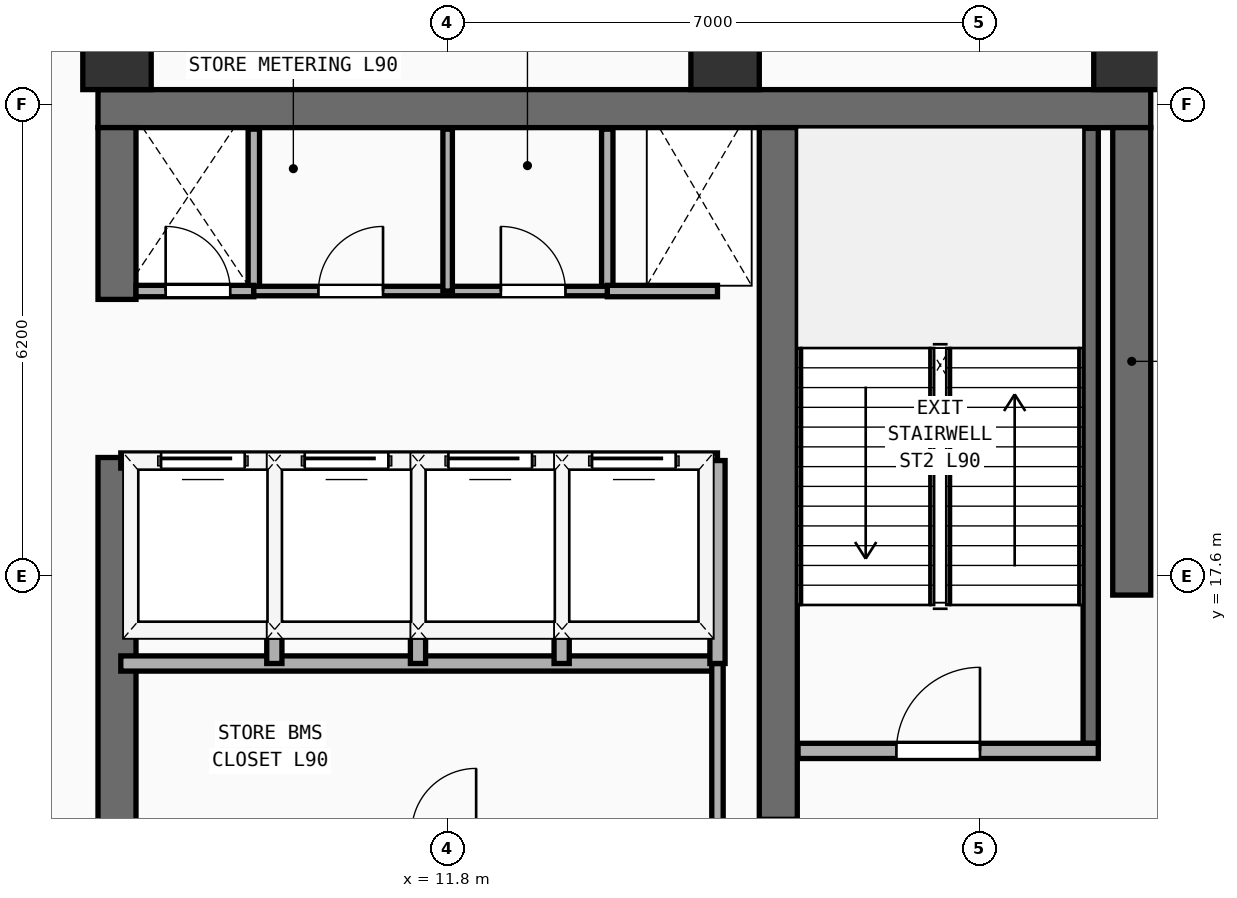
"""IFC4 building model, lengths in metres.
Left out: names, types, materials, properties, quantities, classifications, styles, units other than length and angle.
Written with IfcOpenShell. Run it as: python <this file> out.ifc"""

import sys

from ifc_helpers import new_model, si_unit, direction, frame, frame_2d, origin, origin_2d, place, context, subcontext, project, spatial, rectangle, extrude, element, fill, save


model = new_model("IFC4")
c1 = context("Model", 3, precision=1e-05, world=origin(), true_north=direction((0.0, 1.0)))
c2 = subcontext(c1, "Body", "Model", "MODEL_VIEW")
j1 = project(units=[si_unit("LENGTHUNIT", "METRE"), si_unit("PLANEANGLEUNIT", "RADIAN")], contexts=[c1])
p1 = place(None, origin())
s1 = spatial("IfcSite", under=j1, at=p1, CompositionType="ELEMENT")
p2 = place(p1, origin())
s2 = spatial("IfcBuilding", under=s1, at=p2, CompositionType="ELEMENT")
p3 = place(p2, frame((0.0, 0.0, 352.0)))
s3 = spatial("IfcBuildingStorey", under=s2, at=p3, CompositionType="ELEMENT", Elevation=352.0)
p4 = place(p3, frame((7.2, 23.75, 0.0), z_axis=(0.0, 0.0, 1.0), x_axis=(1.0, 0.0, 0.0)))
e1 = element("IfcWall", 1, at=p4, inside=s3, PredefinedType="SHEAR", context=c2, shape_type="SweptSolid", body=[
    extrude(rectangle(XDim=13.85, YDim=0.5, at=frame_2d((6.925, 0.0))), origin(), (0.0, 0.0, 1.0), 3.82),
])
p5 = place(p3, frame((7.45, 14.35, 0.0), z_axis=(0.0, 0.0, 1.0), x_axis=(0.0, 1.0, 0.0)))
e2 = element("IfcWall", 2, at=p5, inside=s3, PredefinedType="SHEAR", context=c2, shape_type="SweptSolid", body=[
    extrude(rectangle(XDim=4.81, YDim=0.5, at=frame_2d((2.405, 0.0))), origin(), (0.0, 0.0, 1.0), 3.82),
])
p6 = place(p3, frame((7.45, 21.24, 0.0), z_axis=(0.0, 0.0, 1.0), x_axis=(0.0, 1.0, 0.0)))
e3 = element("IfcWall", 3, at=p6, inside=s3, PredefinedType="SHEAR", context=c2, shape_type="SweptSolid", body=[
    extrude(rectangle(XDim=2.26, YDim=0.5, at=frame_2d((1.13, 0.0))), origin(), (0.0, 0.0, 1.0), 3.82),
])
p7 = place(p3, frame((20.8, 17.35, 0.0), z_axis=(0.0, 0.0, 1.0), x_axis=(0.0, 1.0, 0.0)))
e4 = element("IfcWall", 4, at=p7, inside=s3, PredefinedType="SHEAR", context=c2, shape_type="SweptSolid", body=[
    extrude(rectangle(XDim=6.15, YDim=0.5, at=frame_2d((3.075, 0.0))), origin(), (0.0, 0.0, 1.0), 3.82),
])
p8 = place(p3, frame((16.15, 14.4, 0.0), z_axis=(0.0, 0.0, 1.0), x_axis=(0.0, 1.0, 0.0)))
e5 = element("IfcWall", 5, at=p8, inside=s3, PredefinedType="SHEAR", context=c2, shape_type="SweptSolid", body=[
    extrude(rectangle(XDim=9.1, YDim=0.5, at=frame_2d((4.55, 0.0))), origin(), (0.0, 0.0, 1.0), 3.82),
])
for number, where, z_axis, x_axis in (
    (6, (7.45, 24.45, 0.0), (0.0, 0.0, 1.0), (1.0, 0.0, 0.0)),
    (7, (15.45, 24.45, 0.0), (0.0, 0.0, 1.0), (1.0, 0.0, 0.0)),
    (8, (20.75, 24.45, 0.0), (0.0, 0.0, 1.0), (1.0, 0.0, 0.0)),
):
    element("IfcColumn", number, at=place(p3, frame(where, z_axis=z_axis, x_axis=x_axis)), inside=s3, PredefinedType="COLUMN", context=c2, shape_type="SweptSolid", body=[
        extrude(rectangle(XDim=0.9, YDim=0.9, at=origin_2d()), origin(), (0.0, 0.0, 1.0), 3.82),
    ])
p9 = place(p3, frame((27.685, 19.175, 0.0), z_axis=(0.0, 0.0, 1.0), x_axis=(-0.707106781187, 0.707106781187, 0.0)))
e9 = element("IfcWall", 9, at=p9, inside=s3, PredefinedType="SOLIDWALL", context=c2, shape_type="SweptSolid", body=[
    extrude(rectangle(XDim=9.207, YDim=0.28, at=frame_2d((4.603, 0.0))), origin(), (0.0, 0.0, 1.0), 3.82),
])
p10 = place(p3, frame((20.26, 15.4, 0.0), z_axis=(0.0, 0.0, 1.0), x_axis=(0.0, 1.0, 0.0)))
e10 = element("IfcWall", 10, at=p10, inside=s3, PredefinedType="SHEAR", context=c2, shape_type="SweptSolid", body=[
    extrude(rectangle(XDim=8.09, YDim=0.2, at=frame_2d((4.045, 0.0))), origin(), (0.0, 0.0, 1.0), 3.82),
])
p11 = place(p3, frame((16.41, 15.3, 0.0), z_axis=(0.0, 0.0, 1.0), x_axis=(1.0, 0.0, 0.0)))
e11 = element("IfcWall", 11, at=p11, inside=s3, PredefinedType="PARTITIONING", context=c2, shape_type="SweptSolid", body=[
    extrude(rectangle(XDim=3.95, YDim=0.2, at=frame_2d((1.975, 0.0))), origin(), (0.0, 0.0, 1.0), 3.82),
])
p12 = place(p11, frame((1.294, 0.0, 0.0)))
e12 = element("IfcOpeningElement", 12, at=p12, cuts=e11, PredefinedType="OPENING", context=c2, shape_type="SweptSolid", body=[
    extrude(rectangle(XDim=1.1, YDim=2.2, at=frame_2d((0.55, 1.1))), frame((0.0, 0.11, 0.0), z_axis=(0.0, -1.0, 0.0), x_axis=(1.0, 0.0, 0.0)), (0.0, 0.0, 1.0), 0.22),
])
p13 = place(p3, frame((7.5, 16.45, 0.0), z_axis=(0.0, 0.0, 1.0), x_axis=(1.0, 0.0, 0.0)))
e13 = element("IfcWall", 13, at=p13, inside=s3, PredefinedType="PARTITIONING", context=c2, shape_type="SweptSolid", body=[
    extrude(rectangle(XDim=7.85, YDim=0.2, at=frame_2d((3.925, 0.0))), origin(), (0.0, 0.0, 1.0), 3.82),
])
p14 = place(p3, frame((15.35, 14.22, 0.0), z_axis=(0.0, 0.0, 1.0), x_axis=(0.0, 1.0, 0.0)))
e14 = element("IfcWall", 14, at=p14, inside=s3, PredefinedType="PARTITIONING", context=c2, shape_type="SweptSolid", body=[
    extrude(rectangle(XDim=2.23, YDim=0.15, at=frame_2d((1.115, 0.0))), origin(), (0.0, 0.0, 1.0), 3.82),
])
p15 = place(p3, frame((7.5, 19.12, 0.0), z_axis=(0.0, 0.0, 1.0), x_axis=(1.0, 0.0, 0.0)))
e15 = element("IfcWall", 15, at=p15, inside=s3, PredefinedType="PARTITIONING", context=c2, shape_type="SweptSolid", body=[
    extrude(rectangle(XDim=7.85, YDim=0.2, at=frame_2d((3.925, 0.0))), origin(), (0.0, 0.0, 1.0), 3.82),
])
p16 = place(p15, frame((0.53, 0.0, 0.0)))
e16 = element("IfcOpeningElement", 16, at=p16, cuts=e15, PredefinedType="OPENING", context=c2, shape_type="SweptSolid", body=[
    extrude(rectangle(XDim=1.1, YDim=2.2, at=frame_2d((0.55, 1.1))), frame((0.0, 0.11, 0.0), z_axis=(0.0, -1.0, 0.0), x_axis=(1.0, 0.0, 0.0)), (0.0, 0.0, 1.0), 0.22),
])
p17 = place(p15, frame((2.42, 0.0, 0.0)))
e17 = element("IfcOpeningElement", 17, at=p17, cuts=e15, PredefinedType="OPENING", context=c2, shape_type="SweptSolid", body=[
    extrude(rectangle(XDim=1.1, YDim=2.2, at=frame_2d((0.55, 1.1))), frame((0.0, 0.11, 0.0), z_axis=(0.0, -1.0, 0.0), x_axis=(1.0, 0.0, 0.0)), (0.0, 0.0, 1.0), 0.22),
])
p18 = place(p15, frame((4.31, 0.0, 0.0)))
e18 = element("IfcOpeningElement", 18, at=p18, cuts=e15, PredefinedType="OPENING", context=c2, shape_type="SweptSolid", body=[
    extrude(rectangle(XDim=1.1, YDim=2.2, at=frame_2d((0.55, 1.1))), frame((0.0, 0.11, 0.0), z_axis=(0.0, -1.0, 0.0), x_axis=(1.0, 0.0, 0.0)), (0.0, 0.0, 1.0), 0.22),
])
p19 = place(p15, frame((6.2, 0.0, 0.0)))
e19 = element("IfcOpeningElement", 19, at=p19, cuts=e15, PredefinedType="OPENING", context=c2, shape_type="SweptSolid", body=[
    extrude(rectangle(XDim=1.1, YDim=2.2, at=frame_2d((0.55, 1.1))), frame((0.0, 0.11, 0.0), z_axis=(0.0, -1.0, 0.0), x_axis=(1.0, 0.0, 0.0)), (0.0, 0.0, 1.0), 0.22),
])
for number, where, z_axis, x_axis in (
    (20, (15.35, 16.45, 0.0), (0.0, 0.0, 1.0), (0.0, 1.0, 0.0)),
    (21, (9.52, 16.45, 0.0), (0.0, 0.0, 1.0), (0.0, 1.0, 0.0)),
    (22, (11.41, 16.45, 0.0), (0.0, 0.0, 1.0), (0.0, 1.0, 0.0)),
    (23, (13.3, 16.45, 0.0), (0.0, 0.0, 1.0), (0.0, 1.0, 0.0)),
):
    element("IfcWall", number, at=place(p3, frame(where, z_axis=z_axis, x_axis=x_axis)), inside=s3, PredefinedType="PARTITIONING", context=c2, shape_type="SweptSolid", body=[
        extrude(rectangle(XDim=2.67, YDim=0.2, at=frame_2d((1.335, 0.0))), origin(), (0.0, 0.0, 1.0), 3.82),
    ])
for number, where, z_axis, x_axis in (
    (24, (9.25, 21.35, 0.0), (0.0, 0.0, 1.0), (0.0, 1.0, 0.0)),
    (25, (13.9, 21.35, 0.0), (0.0, 0.0, 1.0), (0.0, 1.0, 0.0)),
):
    element("IfcWall", number, at=place(p3, frame(where, z_axis=z_axis, x_axis=x_axis)), inside=s3, PredefinedType="PARTITIONING", context=c2, shape_type="SweptSolid", body=[
        extrude(rectangle(XDim=2.13, YDim=0.15, at=frame_2d((1.065, 0.0))), origin(), (0.0, 0.0, 1.0), 3.82),
    ])
p20 = place(p3, frame((7.7, 21.35, 0.0), z_axis=(0.0, 0.0, 1.0), x_axis=(1.0, 0.0, 0.0)))
e26 = element("IfcWall", 26, at=p20, inside=s3, PredefinedType="PARTITIONING", context=c2, shape_type="SweptSolid", body=[
    extrude(rectangle(XDim=1.55, YDim=0.15, at=frame_2d((0.775, 0.0))), origin(), (0.0, 0.0, 1.0), 3.82),
])
p21 = place(p20, frame((0.39, 0.0, 0.0)))
e27 = element("IfcOpeningElement", 27, at=p21, cuts=e26, PredefinedType="OPENING", context=c2, shape_type="SweptSolid", body=[
    extrude(rectangle(XDim=0.85, YDim=2.15, at=frame_2d((0.425, 1.075))), frame((0.0, 0.085, 0.0), z_axis=(0.0, -1.0, 0.0), x_axis=(1.0, 0.0, 0.0)), (0.0, 0.0, 1.0), 0.17),
])
p22 = place(p3, frame((13.9, 21.35, 0.0), z_axis=(0.0, 0.0, 1.0), x_axis=(1.0, 0.0, 0.0)))
e28 = element("IfcWall", 28, at=p22, inside=s3, PredefinedType="PARTITIONING", context=c2, shape_type="SweptSolid", body=[
    extrude(rectangle(XDim=1.45, YDim=0.15, at=frame_2d((0.725, 0.0))), origin(), (0.0, 0.0, 1.0), 3.82),
])
p23 = place(p3, frame((9.25, 21.35, 0.0), z_axis=(0.0, 0.0, 1.0), x_axis=(1.0, 0.0, 0.0)))
e29 = element("IfcWall", 29, at=p23, inside=s3, PredefinedType="PARTITIONING", context=c2, shape_type="SweptSolid", body=[
    extrude(rectangle(XDim=4.65, YDim=0.125, at=frame_2d((2.325, 0.0))), origin(), (0.0, 0.0, 1.0), 3.82),
])
p24 = place(p23, frame((0.85, 0.0, 0.0)))
e30 = element("IfcOpeningElement", 30, at=p24, cuts=e29, PredefinedType="OPENING", context=c2, shape_type="SweptSolid", body=[
    extrude(rectangle(XDim=0.85, YDim=2.15, at=frame_2d((0.425, 1.075))), frame((0.0, 0.073, 0.0), z_axis=(0.0, -1.0, 0.0), x_axis=(1.0, 0.0, 0.0)), (0.0, 0.0, 1.0), 0.145),
])
p25 = place(p23, frame((3.25, 0.0, 0.0)))
e31 = element("IfcOpeningElement", 31, at=p25, cuts=e29, PredefinedType="OPENING", context=c2, shape_type="SweptSolid", body=[
    extrude(rectangle(XDim=0.85, YDim=2.15, at=frame_2d((0.425, 1.075))), frame((0.0, 0.073, 0.0), z_axis=(0.0, -1.0, 0.0), x_axis=(1.0, 0.0, 0.0)), (0.0, 0.0, 1.0), 0.145),
])
p26 = place(p3, frame((11.8, 21.35, 0.0), z_axis=(0.0, 0.0, 1.0), x_axis=(0.0, 1.0, 0.0)))
e32 = element("IfcWall", 32, at=p26, inside=s3, PredefinedType="PARTITIONING", context=c2, shape_type="SweptSolid", body=[
    extrude(rectangle(XDim=2.13, YDim=0.125, at=frame_2d((1.065, 0.0))), origin(), (0.0, 0.0, 1.0), 3.82),
])
p27 = place(p12, origin())
e33 = element("IfcDoor", 33, at=p27, inside=s3, OperationType="SINGLE_SWING_RIGHT", PredefinedType="DOOR", context=c2, shape_type="SweptSolid", body=[
    extrude(rectangle(XDim=1.1, YDim=2.2, at=frame_2d((0.55, 1.1))), frame((0.0, 0.025, 0.0), z_axis=(0.0, -1.0, 0.0), x_axis=(1.0, 0.0, 0.0)), (0.0, 0.0, 1.0), 0.05),
])
fill(e12, e33)
p28 = place(p16, origin())
e34 = element("IfcDoor", 34, at=p28, inside=s3, OperationType="SLIDING_TO_LEFT", PredefinedType="DOOR", context=c2, shape_type="SweptSolid", body=[
    extrude(rectangle(XDim=1.1, YDim=2.2, at=frame_2d((0.55, 1.1))), frame((0.0, 0.025, 0.0), z_axis=(0.0, -1.0, 0.0), x_axis=(1.0, 0.0, 0.0)), (0.0, 0.0, 1.0), 0.05),
])
fill(e16, e34)
p29 = place(p17, origin())
e35 = element("IfcDoor", 35, at=p29, inside=s3, OperationType="SLIDING_TO_LEFT", PredefinedType="DOOR", context=c2, shape_type="SweptSolid", body=[
    extrude(rectangle(XDim=1.1, YDim=2.2, at=frame_2d((0.55, 1.1))), frame((0.0, 0.025, 0.0), z_axis=(0.0, -1.0, 0.0), x_axis=(1.0, 0.0, 0.0)), (0.0, 0.0, 1.0), 0.05),
])
fill(e17, e35)
p30 = place(p18, origin())
e36 = element("IfcDoor", 36, at=p30, inside=s3, OperationType="SLIDING_TO_LEFT", PredefinedType="DOOR", context=c2, shape_type="SweptSolid", body=[
    extrude(rectangle(XDim=1.1, YDim=2.2, at=frame_2d((0.55, 1.1))), frame((0.0, 0.025, 0.0), z_axis=(0.0, -1.0, 0.0), x_axis=(1.0, 0.0, 0.0)), (0.0, 0.0, 1.0), 0.05),
])
fill(e18, e36)
p31 = place(p19, origin())
e37 = element("IfcDoor", 37, at=p31, inside=s3, OperationType="SLIDING_TO_LEFT", PredefinedType="DOOR", context=c2, shape_type="SweptSolid", body=[
    extrude(rectangle(XDim=1.1, YDim=2.2, at=frame_2d((0.55, 1.1))), frame((0.0, 0.025, 0.0), z_axis=(0.0, -1.0, 0.0), x_axis=(1.0, 0.0, 0.0)), (0.0, 0.0, 1.0), 0.05),
])
fill(e19, e37)
p32 = place(p21, origin())
e38 = element("IfcDoor", 38, at=p32, inside=s3, OperationType="SINGLE_SWING_LEFT", PredefinedType="DOOR", context=c2, shape_type="SweptSolid", body=[
    extrude(rectangle(XDim=0.85, YDim=2.15, at=frame_2d((0.425, 1.075))), frame((0.0, 0.025, 0.0), z_axis=(0.0, -1.0, 0.0), x_axis=(1.0, 0.0, 0.0)), (0.0, 0.0, 1.0), 0.05),
])
fill(e27, e38)
p33 = place(p24, origin())
e39 = element("IfcDoor", 39, at=p33, inside=s3, OperationType="SINGLE_SWING_RIGHT", PredefinedType="DOOR", context=c2, shape_type="SweptSolid", body=[
    extrude(rectangle(XDim=0.85, YDim=2.15, at=frame_2d((0.425, 1.075))), frame((0.0, 0.025, 0.0), z_axis=(0.0, -1.0, 0.0), x_axis=(1.0, 0.0, 0.0)), (0.0, 0.0, 1.0), 0.05),
])
fill(e30, e39)
p34 = place(p25, origin())
e40 = element("IfcDoor", 40, at=p34, inside=s3, OperationType="SINGLE_SWING_LEFT", PredefinedType="DOOR", context=c2, shape_type="SweptSolid", body=[
    extrude(rectangle(XDim=0.85, YDim=2.15, at=frame_2d((0.425, 1.075))), frame((0.0, 0.025, 0.0), z_axis=(0.0, -1.0, 0.0), x_axis=(1.0, 0.0, 0.0)), (0.0, 0.0, 1.0), 0.05),
])
fill(e31, e40)
save(model, sys.argv[1])
